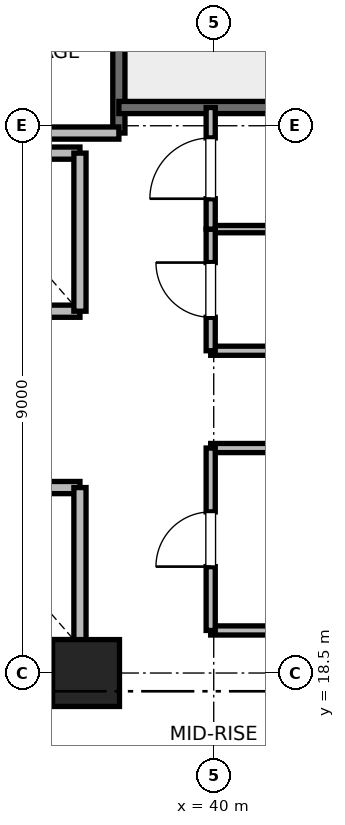
"""IFC4 building model, lengths in metres.
Left out: names, types, materials, properties, quantities, classifications, styles, units other than length and angle.
Written with IfcOpenShell. Run it as: python <this file> out.ifc"""

import sys

from ifc_helpers import new_model, si_unit, direction, frame, frame_2d, origin, origin_2d, place, context, subcontext, project, spatial, rectangle, extrude, element, fill, save


model = new_model("IFC4")
c1 = context("Model", 3, precision=1e-05, world=origin(), true_north=direction((0.0, 1.0)))
c2 = subcontext(c1, "Body", "Model", "MODEL_VIEW")
j1 = project(units=[si_unit("LENGTHUNIT", "METRE"), si_unit("PLANEANGLEUNIT", "RADIAN")], contexts=[c1])
p1 = place(None, origin())
s1 = spatial("IfcSite", under=j1, at=p1, CompositionType="ELEMENT")
p2 = place(p1, origin())
s2 = spatial("IfcBuilding", under=s1, at=p2, CompositionType="ELEMENT")
p3 = place(p2, frame((0.0, 0.0, 123.4)))
s3 = spatial("IfcBuildingStorey", under=s2, at=p3, CompositionType="ELEMENT", Elevation=123.4)
p4 = place(p3, frame((37.9, 18.5, 0.0), z_axis=(0.0, 0.0, 1.0), x_axis=(1.0, 0.0, 0.0)))
e1 = element("IfcColumn", 1, at=p4, inside=s3, PredefinedType="PILASTER", context=c2, shape_type="SweptSolid", body=[
    extrude(rectangle(XDim=1.1, YDim=1.1, at=origin_2d()), origin(), (0.0, 0.0, 1.0), 5.0),
])
p5 = place(p3, frame((29.0, 18.5, 0.0), z_axis=(0.0, 0.0, 1.0), x_axis=(1.0, 0.0, 0.0)))
e2 = element("IfcWall", 2, at=p5, inside=s3, PredefinedType="SHEAR", context=c2, shape_type="SweptSolid", body=[
    extrude(rectangle(XDim=9.2, YDim=0.55, at=frame_2d((4.6, 0.0))), origin(), (0.0, 0.0, 1.0), 4.775),
])
p6 = place(p3, frame((38.44, 27.38, 0.0), z_axis=(0.0, 0.0, 1.0), x_axis=(0.0, 1.0, 0.0)))
e3 = element("IfcWall", 3, at=p6, inside=s3, PredefinedType="SOLIDWALL", context=c2, shape_type="SweptSolid", body=[
    extrude(rectangle(XDim=8.87, YDim=0.2, at=frame_2d((4.435, 0.0))), origin(), (0.0, 0.0, 1.0), 4.775),
])
p7 = place(p3, frame((38.44, 27.8, 0.0), z_axis=(0.0, 0.0, 1.0), x_axis=(1.0, 0.0, 0.0)))
e4 = element("IfcWall", 4, at=p7, inside=s3, PredefinedType="SOLIDWALL", context=c2, shape_type="SweptSolid", body=[
    extrude(rectangle(XDim=3.32, YDim=0.2, at=frame_2d((1.66, 0.0))), origin(), (0.0, 0.0, 1.0), 4.775),
])
p8 = place(p3, frame((32.82, 27.38, 0.0), z_axis=(0.0, 0.0, 1.0), x_axis=(1.0, 0.0, 0.0)))
e5 = element("IfcWall", 5, at=p8, inside=s3, PredefinedType="PARTITIONING", context=c2, shape_type="SweptSolid", body=[
    extrude(rectangle(XDim=5.62, YDim=0.2, at=frame_2d((2.81, 0.0))), origin(), (0.0, 0.0, 1.0), 4.775),
])
p9 = place(p3, frame((35.5, 18.95, 0.0), z_axis=(0.0, 0.0, 1.0), x_axis=(1.0, 0.0, 0.0)))
e6 = element("IfcWall", 6, at=p9, inside=s3, PredefinedType="SOLIDWALL", context=c2, shape_type="SweptSolid", body=[
    extrude(rectangle(XDim=2.3, YDim=0.2, at=frame_2d((1.15, 0.0))), origin(), (0.0, 0.0, 1.0), 3.755),
])
p10 = place(p3, frame((37.8, 21.55, 0.0), z_axis=(0.0, 0.0, 1.0), x_axis=(-1.0, 0.0, 0.0)))
e7 = element("IfcWall", 7, at=p10, inside=s3, PredefinedType="SOLIDWALL", context=c2, shape_type="SweptSolid", body=[
    extrude(rectangle(XDim=2.3, YDim=0.2, at=frame_2d((1.15, 0.0))), origin(), (0.0, 0.0, 1.0), 4.775),
])
p11 = place(p3, frame((37.8, 18.95, 0.0), z_axis=(0.0, 0.0, 1.0), x_axis=(0.0, 1.0, 0.0)))
e8 = element("IfcWall", 8, at=p11, inside=s3, PredefinedType="SOLIDWALL", context=c2, shape_type="SweptSolid", body=[
    extrude(rectangle(XDim=2.6, YDim=0.2, at=frame_2d((1.3, 0.0))), origin(), (0.0, 0.0, 1.0), 3.755),
])
for number, where, z_axis, x_axis in (
    (9, (35.5, 24.45, 0.0), (0.0, 0.0, 1.0), (1.0, 0.0, 0.0)),
    (10, (37.8, 27.05, 0.0), (0.0, 0.0, 1.0), (-1.0, 0.0, 0.0)),
):
    element("IfcWall", number, at=place(p3, frame(where, z_axis=z_axis, x_axis=x_axis)), inside=s3, PredefinedType="SOLIDWALL", context=c2, shape_type="SweptSolid", body=[
        extrude(rectangle(XDim=2.3, YDim=0.2, at=frame_2d((1.15, 0.0))), origin(), (0.0, 0.0, 1.0), 4.775),
    ])
p12 = place(p3, frame((37.8, 24.45, 0.0), z_axis=(0.0, 0.0, 1.0), x_axis=(0.0, 1.0, 0.0)))
e11 = element("IfcWall", 11, at=p12, inside=s3, PredefinedType="SOLIDWALL", context=c2, shape_type="SweptSolid", body=[
    extrude(rectangle(XDim=2.6, YDim=0.2, at=frame_2d((1.3, 0.0))), origin(), (0.0, 0.0, 1.0), 4.775),
])
for number, where, z_axis, x_axis in (
    (12, (39.95, 19.2, 0.0), (0.0, 0.0, 1.0), (1.0, 0.0, 0.0)),
    (13, (39.95, 22.2, 0.0), (0.0, 0.0, 1.0), (1.0, 0.0, 0.0)),
    (14, (39.95, 23.8, 0.0), (0.0, 0.0, 1.0), (1.0, 0.0, 0.0)),
):
    element("IfcWall", number, at=place(p3, frame(where, z_axis=z_axis, x_axis=x_axis)), inside=s3, PredefinedType="PARTITIONING", context=c2, shape_type="SweptSolid", body=[
        extrude(rectangle(XDim=1.81, YDim=0.15, at=frame_2d((0.905, 0.0))), origin(), (0.0, 0.0, 1.0), 2.85),
    ])
p13 = place(p3, frame((39.95, 25.8, 0.0), z_axis=(0.0, 0.0, 1.0), x_axis=(1.0, 0.0, 0.0)))
e15 = element("IfcWall", 15, at=p13, inside=s3, PredefinedType="PARTITIONING", context=c2, shape_type="SweptSolid", body=[
    extrude(rectangle(XDim=1.81, YDim=0.12, at=frame_2d((0.905, 0.0))), origin(), (0.0, 0.0, 1.0), 2.85),
])
p14 = place(p3, frame((39.95, 19.2, 0.0), z_axis=(0.0, 0.0, 1.0), x_axis=(0.0, 1.0, 0.0)))
e16 = element("IfcWall", 16, at=p14, inside=s3, PredefinedType="PARTITIONING", context=c2, shape_type="SweptSolid", body=[
    extrude(rectangle(XDim=3.0, YDim=0.15, at=frame_2d((1.5, 0.0))), origin(), (0.0, 0.0, 1.0), 2.85),
])
p15 = place(p14, frame((1.05, 0.0, 0.0)))
e17 = element("IfcOpeningElement", 17, at=p15, cuts=e16, PredefinedType="OPENING", context=c2, shape_type="SweptSolid", body=[
    extrude(rectangle(XDim=0.9, YDim=2.1, at=frame_2d((0.45, 1.05))), frame((0.0, 0.075, 0.0), z_axis=(0.0, -1.0, 0.0), x_axis=(1.0, 0.0, 0.0)), (0.0, 0.0, 1.0), 0.15),
])
p16 = place(p3, frame((39.95, 23.8, 0.0), z_axis=(0.0, 0.0, 1.0), x_axis=(0.0, 1.0, 0.0)))
e18 = element("IfcWall", 18, at=p16, inside=s3, PredefinedType="PARTITIONING", context=c2, shape_type="SweptSolid", body=[
    extrude(rectangle(XDim=2.0, YDim=0.15, at=frame_2d((1.0, 0.0))), origin(), (0.0, 0.0, 1.0), 2.85),
])
p17 = place(p16, frame((0.55, 0.0, 0.0)))
e19 = element("IfcOpeningElement", 19, at=p17, cuts=e18, PredefinedType="OPENING", context=c2, shape_type="SweptSolid", body=[
    extrude(rectangle(XDim=0.9, YDim=2.1, at=frame_2d((0.45, 1.05))), frame((0.0, 0.075, 0.0), z_axis=(0.0, -1.0, 0.0), x_axis=(1.0, 0.0, 0.0)), (0.0, 0.0, 1.0), 0.15),
])
p18 = place(p3, frame((39.95, 25.8, 0.0), z_axis=(0.0, 0.0, 1.0), x_axis=(0.0, 1.0, 0.0)))
e20 = element("IfcWall", 20, at=p18, inside=s3, PredefinedType="PARTITIONING", context=c2, shape_type="SweptSolid", body=[
    extrude(rectangle(XDim=2.0, YDim=0.15, at=frame_2d((1.0, 0.0))), origin(), (0.0, 0.0, 1.0), 2.85),
])
p19 = place(p18, frame((0.5, 0.0, 0.0)))
e21 = element("IfcOpeningElement", 21, at=p19, cuts=e20, PredefinedType="OPENING", context=c2, shape_type="SweptSolid", body=[
    extrude(rectangle(XDim=1.0, YDim=2.15, at=frame_2d((0.5, 1.075))), frame((0.0, 0.075, 0.0), z_axis=(0.0, -1.0, 0.0), x_axis=(1.0, 0.0, 0.0)), (0.0, 0.0, 1.0), 0.15),
])
p20 = place(p15, origin())
e22 = element("IfcDoor", 22, at=p20, inside=s3, OperationType="SINGLE_SWING_LEFT", PredefinedType="DOOR", context=c2, shape_type="SweptSolid", body=[
    extrude(rectangle(XDim=0.9, YDim=2.1, at=frame_2d((0.45, 1.05))), frame((0.0, 0.025, 0.0), z_axis=(0.0, -1.0, 0.0), x_axis=(1.0, 0.0, 0.0)), (0.0, 0.0, 1.0), 0.05),
])
fill(e17, e22)
p21 = place(p17, origin())
e23 = element("IfcDoor", 23, at=p21, inside=s3, OperationType="SINGLE_SWING_RIGHT", PredefinedType="DOOR", context=c2, shape_type="SweptSolid", body=[
    extrude(rectangle(XDim=0.9, YDim=2.1, at=frame_2d((0.45, 1.05))), frame((0.0, 0.025, 0.0), z_axis=(0.0, -1.0, 0.0), x_axis=(1.0, 0.0, 0.0)), (0.0, 0.0, 1.0), 0.05),
])
fill(e19, e23)
p22 = place(p19, origin())
e24 = element("IfcDoor", 24, at=p22, inside=s3, OperationType="SINGLE_SWING_LEFT", PredefinedType="DOOR", context=c2, shape_type="SweptSolid", body=[
    extrude(rectangle(XDim=1.0, YDim=2.15, at=frame_2d((0.5, 1.075))), frame((0.0, 0.025, 0.0), z_axis=(0.0, -1.0, 0.0), x_axis=(1.0, 0.0, 0.0)), (0.0, 0.0, 1.0), 0.05),
])
fill(e21, e24)
save(model, sys.argv[1])
